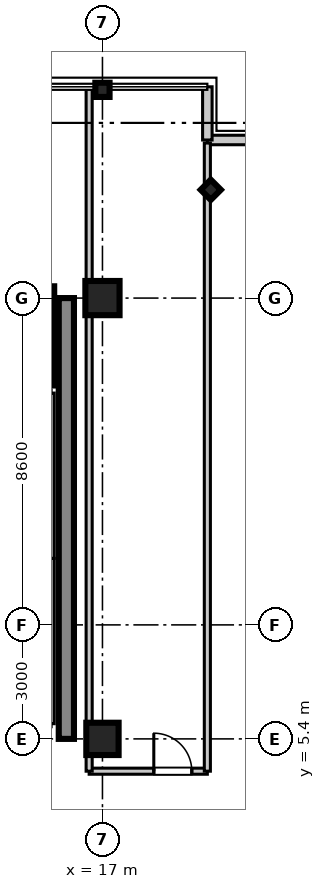
"""IFC4 building model, lengths in metres.
Left out: names, types, materials, properties, quantities, classifications, styles, units other than length and angle.
Written with IfcOpenShell. Run it as: python <this file> out.ifc"""

import sys

from ifc_helpers import new_model, si_unit, direction, frame, frame_2d, origin, origin_2d, place, context, subcontext, project, spatial, rectangle, i_section, extrude, source, transform, mapped, element, fill, save


model = new_model("IFC4")
c1 = context("Model", 3, precision=1e-05, world=origin(), true_north=direction((0.0, 1.0)))
c2 = subcontext(c1, "Body", "Model", "MODEL_VIEW")
j1 = project(units=[si_unit("LENGTHUNIT", "METRE"), si_unit("PLANEANGLEUNIT", "RADIAN")], contexts=[c1])
p1 = place(None, origin())
s1 = spatial("IfcSite", under=j1, at=p1, CompositionType="ELEMENT")
p2 = place(p1, origin())
s2 = spatial("IfcBuilding", under=s1, at=p2, CompositionType="ELEMENT")
p3 = place(p2, frame((0.0, 0.0, 288.8)))
s3 = spatial("IfcBuildingStorey", under=s2, at=p3, CompositionType="ELEMENT", Elevation=288.8)
m1 = source(origin(), c2, "Body", "SweptSolid", [
    extrude(rectangle(XDim=0.85, YDim=0.85, at=origin_2d()), origin(), (0.0, 0.0, 1.0), 3.805),
])
p4 = place(p3, frame((17.0, 5.4, 0.0), z_axis=(0.0, 0.0, 1.0), x_axis=(1.0, 0.0, 0.0)))
e1 = element("IfcColumn", 1, at=p4, inside=s3, PredefinedType="PILASTER", context=c2, shape_type="MappedRepresentation", body=[
    mapped(m1, transform((0.0, 0.0, 0.0), scale=1.0)),
])
m2 = source(origin(), c2, "Body", "SweptSolid", [
    extrude(rectangle(XDim=0.9, YDim=0.9, at=origin_2d()), origin(), (0.0, 0.0, 1.0), 3.805),
])
p5 = place(p3, frame((17.0, 17.0, 0.0), z_axis=(0.0, 0.0, 1.0), x_axis=(1.0, 0.0, 0.0)))
e2 = element("IfcColumn", 2, at=p5, inside=s3, PredefinedType="COLUMN", context=c2, shape_type="MappedRepresentation", body=[
    mapped(m2, transform((0.0, 0.0, 0.0), scale=1.0)),
])
m3 = source(origin(), c2, "Body", "SweptSolid", [
    extrude(i_section(OverallWidth=0.374, OverallDepth=0.374, WebThickness=0.014, FlangeThickness=0.023, at=origin_2d()), origin(), (0.0, 0.0, 1.0), 3.805),
])
for number, where, z_axis, x_axis in (
    (3, (17.0, 22.48, 0.0), (0.0, 0.0, 1.0), (0.0, 1.0, 0.0)),
    (4, (19.85, 19.85, 0.0), (0.0, 0.0, 1.0), (0.707, 0.707, 0.0)),
):
    element("IfcColumn", number, at=place(p3, frame(where, z_axis=z_axis, x_axis=x_axis)), inside=s3, PredefinedType="COLUMN", context=c2, shape_type="MappedRepresentation", body=[
        mapped(m3, transform((0.0, 0.0, 0.0), scale=1.0)),
    ])
m4 = source(origin(), c2, "Body", "SweptSolid", [
    extrude(rectangle(XDim=11.6, YDim=0.4, at=frame_2d((5.8, 0.0))), origin(), (0.0, 0.0, 1.0), 3.55),
])
p6 = place(p3, frame((16.05, 5.4, 0.0), z_axis=(0.0, 0.0, 1.0), x_axis=(0.0, 1.0, 0.0)))
e5 = element("IfcWall", 5, at=p6, inside=s3, PredefinedType="SHEAR", context=c2, shape_type="MappedRepresentation", body=[
    mapped(m4, transform((0.0, 0.0, 0.0), scale=1.0)),
])
m5 = source(origin(), c2, "Body", "SweptSolid", [
    extrude(rectangle(XDim=2.61, YDim=0.22, at=frame_2d((1.305, 0.0))), origin(), (0.0, 0.0, 1.0), 3.55),
])
p7 = place(p3, frame((15.62, 14.7, 0.0), z_axis=(0.0, 0.0, 1.0), x_axis=(0.0, 1.0, 0.0)))
e6 = element("IfcWall", 6, at=p7, inside=s3, PredefinedType="SHEAR", context=c2, shape_type="MappedRepresentation", body=[
    mapped(m5, transform((0.0, 0.0, 0.0), scale=1.0)),
])
m6 = source(origin(), c2, "Body", "SweptSolid", [
    extrude(rectangle(XDim=1.4, YDim=0.25, at=frame_2d((0.7, 0.0))), origin(), (0.0, 0.0, 1.0), 3.55),
])
p8 = place(p3, frame((19.76, 21.16, 0.0), z_axis=(0.0, 0.0, 1.0), x_axis=(1.0, 0.0, 0.0)))
e7 = element("IfcWall", 7, at=p8, inside=s3, PredefinedType="STANDARD", context=c2, shape_type="MappedRepresentation", body=[
    mapped(m6, transform((0.0, 0.0, 0.0), scale=1.0)),
])
m7 = source(origin(), c2, "Body", "SweptSolid", [
    extrude(rectangle(XDim=1.4, YDim=0.25, at=frame_2d((0.7, 0.0))), origin(), (0.0, 0.0, 1.0), 3.55),
])
p9 = place(p3, frame((19.76, 21.16, 0.0), z_axis=(0.0, 0.0, 1.0), x_axis=(0.0, 1.0, 0.0)))
e8 = element("IfcWall", 8, at=p9, inside=s3, PredefinedType="STANDARD", context=c2, shape_type="MappedRepresentation", body=[
    mapped(m7, transform((0.0, 0.0, 0.0), scale=1.0)),
])
m8 = source(origin(), c2, "Body", "SweptSolid", [
    extrude(rectangle(XDim=4.35, YDim=0.16, at=frame_2d((2.175, 0.0))), origin(), (0.0, 0.0, 1.0), 2.89),
])
p10 = place(p3, frame((15.65, 5.8, 0.0), z_axis=(0.0, 0.0, 1.0), x_axis=(0.0, 1.0, 0.0)))
e9 = element("IfcWall", 9, at=p10, inside=s3, PredefinedType="PARTITIONING", context=c2, shape_type="MappedRepresentation", body=[
    mapped(m8, transform((0.0, 0.0, 0.0), scale=1.0)),
])
m9 = source(origin(), c2, "Body", "SweptSolid", [
    extrude(rectangle(XDim=4.35, YDim=0.16, at=frame_2d((2.175, 0.0))), origin(), (0.0, 0.0, 1.0), 2.89),
])
p11 = place(p3, frame((15.65, 10.15, 0.0), z_axis=(0.0, 0.0, 1.0), x_axis=(0.0, 1.0, 0.0)))
e10 = element("IfcWall", 10, at=p11, inside=s3, PredefinedType="PARTITIONING", context=c2, shape_type="MappedRepresentation", body=[
    mapped(m9, transform((0.0, 0.0, 0.0), scale=1.0)),
])
m10 = source(origin(), c2, "Body", "SweptSolid", [
    extrude(rectangle(XDim=3.11, YDim=0.16, at=frame_2d((1.555, 0.0))), origin(), (0.0, 0.0, 1.0), 2.89),
])
p12 = place(p3, frame((16.65, 4.55, 0.0), z_axis=(0.0, 0.0, 1.0), x_axis=(1.0, 0.0, 0.0)))
e11 = element("IfcWall", 11, at=p12, inside=s3, PredefinedType="PARTITIONING", context=c2, shape_type="MappedRepresentation", body=[
    mapped(m10, transform((0.0, 0.0, 0.0), scale=1.0)),
])
p13 = place(p12, frame((1.701, 0.0, 0.0)))
e12 = element("IfcOpeningElement", 12, at=p13, cuts=e11, PredefinedType="OPENING", context=c2, shape_type="SweptSolid", body=[
    extrude(rectangle(XDim=1.0, YDim=2.1, at=frame_2d((0.5, 1.05))), frame((0.0, 0.09, 0.0), z_axis=(0.0, -1.0, 0.0), x_axis=(1.0, 0.0, 0.0)), (0.0, 0.0, 1.0), 0.18),
])
m11 = source(origin(), c2, "Body", "SweptSolid", [
    extrude(rectangle(XDim=17.95, YDim=0.16, at=frame_2d((8.975, 0.0))), origin(), (0.0, 0.0, 1.0), 2.89),
])
p14 = place(p3, frame((16.65, 4.55, 0.0), z_axis=(0.0, 0.0, 1.0), x_axis=(0.0, 1.0, 0.0)))
e13 = element("IfcWall", 13, at=p14, inside=s3, PredefinedType="PARTITIONING", context=c2, shape_type="MappedRepresentation", body=[
    mapped(m11, transform((0.0, 0.0, 0.0), scale=1.0)),
])
m12 = source(origin(), c2, "Body", "SweptSolid", [
    extrude(rectangle(XDim=16.53, YDim=0.16, at=frame_2d((8.265, 0.0))), origin(), (0.0, 0.0, 1.0), 2.89),
])
p15 = place(p3, frame((19.76, 4.55, 0.0), z_axis=(0.0, 0.0, 1.0), x_axis=(0.0, 1.0, 0.0)))
e14 = element("IfcWall", 14, at=p15, inside=s3, PredefinedType="PARTITIONING", context=c2, shape_type="MappedRepresentation", body=[
    mapped(m12, transform((0.0, 0.0, 0.0), scale=1.0)),
])
m13 = source(origin(), c2, "Body", "SweptSolid", [
    extrude(rectangle(XDim=1.0, YDim=2.1, at=frame_2d((0.5, 1.05))), frame((0.0, 0.025, 0.0), z_axis=(0.0, -1.0, 0.0), x_axis=(1.0, 0.0, 0.0)), (0.0, 0.0, 1.0), 0.05),
])
p16 = place(p13, origin())
e15 = element("IfcDoor", 15, at=p16, inside=s3, OperationType="SINGLE_SWING_LEFT", PredefinedType="DOOR", context=c2, shape_type="MappedRepresentation", body=[
    mapped(m13, transform((0.0, 0.0, 0.0), scale=1.0)),
])
fill(e12, e15)
save(model, sys.argv[1])
